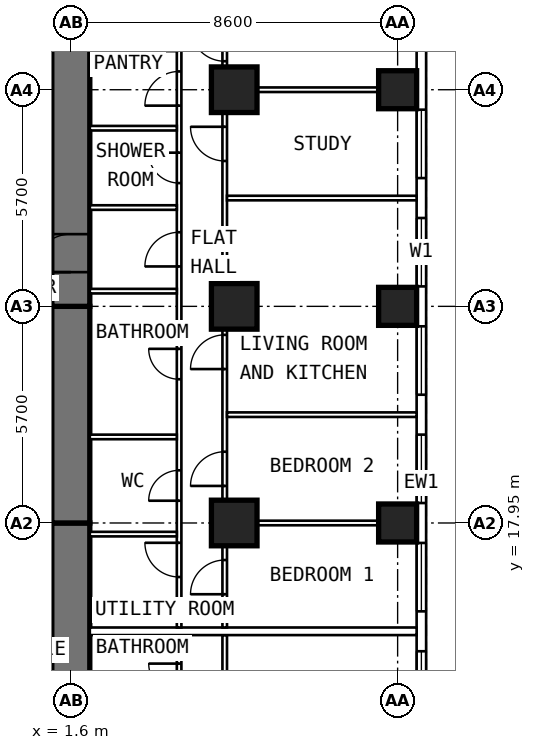
"""IFC4 building model, lengths in metres.
Left out: names, types, materials, properties, quantities, classifications, styles, units other than length and angle.
Written with IfcOpenShell. Run it as: python <this file> out.ifc"""

import sys

from ifc_helpers import new_model, si_unit, direction, frame, frame_2d, origin, origin_2d, place, context, subcontext, project, spatial, rectangle, extrude, element, fill, save


model = new_model("IFC4")
c1 = context("Model", 3, precision=1e-05, world=origin(), true_north=direction((0.0, 1.0)))
c2 = subcontext(c1, "Body", "Model", "MODEL_VIEW")
j1 = project(units=[si_unit("LENGTHUNIT", "METRE"), si_unit("PLANEANGLEUNIT", "RADIAN")], contexts=[c1])
p1 = place(None, origin())
s1 = spatial("IfcSite", under=j1, at=p1, CompositionType="ELEMENT")
p2 = place(p1, origin())
s2 = spatial("IfcBuilding", under=s1, at=p2, CompositionType="ELEMENT")
p3 = place(p2, frame((0.0, 0.0, 57.4)))
s3 = spatial("IfcBuildingStorey", under=s2, at=p3, CompositionType="ELEMENT", Elevation=57.4)
for number, where, z_axis, x_axis in (
    (1, (10.2, 17.95, 0.0), (0.0, 0.0, 1.0), (0.0, 1.0, 0.0)),
    (2, (10.2, 23.65, 0.0), (0.0, 0.0, 1.0), (0.0, 1.0, 0.0)),
    (3, (10.2, 29.35, 0.0), (0.0, 0.0, 1.0), (0.0, 1.0, 0.0)),
):
    element("IfcColumn", number, at=place(p3, frame(where, z_axis=z_axis, x_axis=x_axis)), inside=s3, PredefinedType="COLUMN", context=c2, shape_type="SweptSolid", body=[
        extrude(rectangle(XDim=1.0, YDim=1.0, at=origin_2d()), origin(), (0.0, 0.0, 1.0), 3.6),
    ])
for number, where, z_axis, x_axis in (
    (4, (5.9, 17.95, 0.0), (0.0, 0.0, 1.0), (0.0, 1.0, 0.0)),
    (5, (5.9, 23.65, 0.0), (0.0, 0.0, 1.0), (0.0, 1.0, 0.0)),
    (6, (5.9, 29.35, 0.0), (0.0, 0.0, 1.0), (0.0, 1.0, 0.0)),
):
    element("IfcColumn", number, at=place(p3, frame(where, z_axis=z_axis, x_axis=x_axis)), inside=s3, PredefinedType="COLUMN", context=c2, shape_type="SweptSolid", body=[
        extrude(rectangle(XDim=1.2, YDim=1.2, at=origin_2d()), origin(), (0.0, 0.0, 1.0), 3.6),
    ])
p4 = place(p3, frame((1.6, 9.6, 0.0), z_axis=(0.0, 0.0, 1.0), x_axis=(0.0, 1.0, 0.0)))
e7 = element("IfcWall", 7, at=p4, inside=s3, PredefinedType="SHEAR", context=c2, shape_type="SweptSolid", body=[
    extrude(rectangle(XDim=8.35, YDim=1.0, at=frame_2d((4.175, 0.0))), origin(), (0.0, 0.0, 1.0), 3.6),
])
p5 = place(p4, frame((1.3, 0.0, 0.0)))
e8 = element("IfcOpeningElement", 8, at=p5, cuts=e7, PredefinedType="OPENING", context=c2, shape_type="SweptSolid", body=[
    extrude(rectangle(XDim=1.0, YDim=2.1, at=frame_2d((0.5, 1.05))), frame((0.0, 0.512, 0.0), z_axis=(0.0, -1.0, 0.0), x_axis=(1.0, 0.0, 0.0)), (0.0, 0.0, 1.0), 1.024),
])
p6 = place(p3, frame((1.6, 17.95, 0.0), z_axis=(0.0, 0.0, 1.0), x_axis=(0.0, 1.0, 0.0)))
e9 = element("IfcWall", 9, at=p6, inside=s3, PredefinedType="SHEAR", context=c2, shape_type="SweptSolid", body=[
    extrude(rectangle(XDim=5.7, YDim=1.0, at=frame_2d((2.85, 0.0))), origin(), (0.0, 0.0, 1.0), 3.6),
])
p7 = place(p3, frame((1.6, 23.65, 0.0), z_axis=(0.0, 0.0, 1.0), x_axis=(0.0, 1.0, 0.0)))
e10 = element("IfcWall", 10, at=p7, inside=s3, PredefinedType="SHEAR", context=c2, shape_type="SweptSolid", body=[
    extrude(rectangle(XDim=10.745, YDim=1.0, at=frame_2d((5.373, 0.0))), origin(), (0.0, 0.0, 1.0), 3.6),
])
p8 = place(p7, frame((0.9, 0.0, 0.0)))
e11 = element("IfcOpeningElement", 11, at=p8, cuts=e10, PredefinedType="OPENING", context=c2, shape_type="SweptSolid", body=[
    extrude(rectangle(XDim=1.0, YDim=2.1, at=frame_2d((0.5, 1.05))), frame((0.0, 0.512, 0.0), z_axis=(0.0, -1.0, 0.0), x_axis=(1.0, 0.0, 0.0)), (0.0, 0.0, 1.0), 1.024),
])
p9 = place(p3, frame((10.825, 6.394, 0.0), z_axis=(0.0, 0.0, 1.0), x_axis=(0.0, 1.0, 0.0)))
e12 = element("IfcWall", 12, at=p9, inside=s3, PredefinedType="SOLIDWALL", context=c2, shape_type="SweptSolid", body=[
    extrude(rectangle(XDim=25.241, YDim=0.25, at=frame_2d((12.621, 0.0))), origin(), (0.0, 0.0, 1.0), 3.35),
])
p10 = place(p9, frame((0.681, 0.0, 0.8)))
e13 = element("IfcOpeningElement", 13, at=p10, cuts=e12, PredefinedType="OPENING", context=c2, shape_type="SweptSolid", body=[
    extrude(rectangle(XDim=1.8, YDim=1.8, at=frame_2d((0.9, 0.9))), frame((0.0, 0.137, 0.0), z_axis=(0.0, -1.0, 0.0), x_axis=(1.0, 0.0, 0.0)), (0.0, 0.0, 1.0), 0.274),
])
p11 = place(p9, frame((3.531, 0.0, 0.8)))
e14 = element("IfcOpeningElement", 14, at=p11, cuts=e12, PredefinedType="OPENING", context=c2, shape_type="SweptSolid", body=[
    extrude(rectangle(XDim=1.8, YDim=1.8, at=frame_2d((0.9, 0.9))), frame((0.0, 0.137, 0.0), z_axis=(0.0, -1.0, 0.0), x_axis=(1.0, 0.0, 0.0)), (0.0, 0.0, 1.0), 0.274),
])
p12 = place(p9, frame((6.381, 0.0, 0.8)))
e15 = element("IfcOpeningElement", 15, at=p12, cuts=e12, PredefinedType="OPENING", context=c2, shape_type="SweptSolid", body=[
    extrude(rectangle(XDim=1.8, YDim=1.8, at=frame_2d((0.9, 0.9))), frame((0.0, 0.137, 0.0), z_axis=(0.0, -1.0, 0.0), x_axis=(1.0, 0.0, 0.0)), (0.0, 0.0, 1.0), 0.274),
])
p13 = place(p9, frame((9.231, 0.0, 0.8)))
e16 = element("IfcOpeningElement", 16, at=p13, cuts=e12, PredefinedType="OPENING", context=c2, shape_type="SweptSolid", body=[
    extrude(rectangle(XDim=1.8, YDim=1.8, at=frame_2d((0.9, 0.9))), frame((0.0, 0.137, 0.0), z_axis=(0.0, -1.0, 0.0), x_axis=(1.0, 0.0, 0.0)), (0.0, 0.0, 1.0), 0.274),
])
p14 = place(p9, frame((12.081, 0.0, 0.8)))
e17 = element("IfcOpeningElement", 17, at=p14, cuts=e12, PredefinedType="OPENING", context=c2, shape_type="SweptSolid", body=[
    extrude(rectangle(XDim=1.8, YDim=1.8, at=frame_2d((0.9, 0.9))), frame((0.0, 0.137, 0.0), z_axis=(0.0, -1.0, 0.0), x_axis=(1.0, 0.0, 0.0)), (0.0, 0.0, 1.0), 0.274),
])
p15 = place(p9, frame((14.931, 0.0, 0.8)))
e18 = element("IfcOpeningElement", 18, at=p15, cuts=e12, PredefinedType="OPENING", context=c2, shape_type="SweptSolid", body=[
    extrude(rectangle(XDim=1.8, YDim=1.8, at=frame_2d((0.9, 0.9))), frame((0.0, 0.137, 0.0), z_axis=(0.0, -1.0, 0.0), x_axis=(1.0, 0.0, 0.0)), (0.0, 0.0, 1.0), 0.274),
])
p16 = place(p9, frame((17.781, 0.0, 0.8)))
e19 = element("IfcOpeningElement", 19, at=p16, cuts=e12, PredefinedType="OPENING", context=c2, shape_type="SweptSolid", body=[
    extrude(rectangle(XDim=1.8, YDim=1.8, at=frame_2d((0.9, 0.9))), frame((0.0, 0.137, 0.0), z_axis=(0.0, -1.0, 0.0), x_axis=(1.0, 0.0, 0.0)), (0.0, 0.0, 1.0), 0.274),
])
p17 = place(p9, frame((20.631, 0.0, 0.8)))
e20 = element("IfcOpeningElement", 20, at=p17, cuts=e12, PredefinedType="OPENING", context=c2, shape_type="SweptSolid", body=[
    extrude(rectangle(XDim=1.8, YDim=1.8, at=frame_2d((0.9, 0.9))), frame((0.0, 0.137, 0.0), z_axis=(0.0, -1.0, 0.0), x_axis=(1.0, 0.0, 0.0)), (0.0, 0.0, 1.0), 0.274),
])
p18 = place(p3, frame((4.45, 10.1, 0.0), z_axis=(0.0, 0.0, 1.0), x_axis=(0.0, 1.0, 0.0)))
e21 = element("IfcWall", 21, at=p18, inside=s3, PredefinedType="PARTITIONING", context=c2, shape_type="SweptSolid", body=[
    extrude(rectangle(XDim=4.9, YDim=0.12, at=frame_2d((2.45, 0.0))), origin(), (0.0, 0.0, 1.0), 3.35),
])
p19 = place(p18, frame((0.75, 0.0, 0.0)))
e22 = element("IfcOpeningElement", 22, at=p19, cuts=e21, PredefinedType="OPENING", context=c2, shape_type="SweptSolid", body=[
    extrude(rectangle(XDim=0.9, YDim=2.1, at=frame_2d((0.45, 1.05))), frame((0.0, 0.072, 0.0), z_axis=(0.0, -1.0, 0.0), x_axis=(1.0, 0.0, 0.0)), (0.0, 0.0, 1.0), 0.144),
])
p20 = place(p18, frame((3.35, 0.0, 0.0)))
e23 = element("IfcOpeningElement", 23, at=p20, cuts=e21, PredefinedType="OPENING", context=c2, shape_type="SweptSolid", body=[
    extrude(rectangle(XDim=0.8, YDim=2.1, at=frame_2d((0.4, 1.05))), frame((0.0, 0.072, 0.0), z_axis=(0.0, -1.0, 0.0), x_axis=(1.0, 0.0, 0.0)), (0.0, 0.0, 1.0), 0.144),
])
p21 = place(p3, frame((5.65, 9.6, 0.0), z_axis=(0.0, 0.0, 1.0), x_axis=(0.0, 1.0, 0.0)))
e24 = element("IfcWall", 24, at=p21, inside=s3, PredefinedType="PARTITIONING", context=c2, shape_type="SweptSolid", body=[
    extrude(rectangle(XDim=5.4, YDim=0.12, at=frame_2d((2.7, 0.0))), origin(), (0.0, 0.0, 1.0), 3.35),
])
p22 = place(p21, frame((3.4, 0.0, 0.0)))
e25 = element("IfcOpeningElement", 25, at=p22, cuts=e24, PredefinedType="OPENING", context=c2, shape_type="SweptSolid", body=[
    extrude(rectangle(XDim=0.9, YDim=2.1, at=frame_2d((0.45, 1.05))), frame((0.0, 0.072, 0.0), z_axis=(0.0, -1.0, 0.0), x_axis=(1.0, 0.0, 0.0)), (0.0, 0.0, 1.0), 0.144),
])
p23 = place(p3, frame((4.45, 15.2, 0.0), z_axis=(0.0, 0.0, 1.0), x_axis=(0.0, 1.0, 0.0)))
e26 = element("IfcWall", 26, at=p23, inside=s3, PredefinedType="PARTITIONING", context=c2, shape_type="SweptSolid", body=[
    extrude(rectangle(XDim=19.195, YDim=0.12, at=frame_2d((9.598, 0.0))), origin(), (0.0, 0.0, 1.0), 3.35),
])
p24 = place(p23, frame((1.329, 0.0, 0.0)))
e27 = element("IfcOpeningElement", 27, at=p24, cuts=e26, PredefinedType="OPENING", context=c2, shape_type="SweptSolid", body=[
    extrude(rectangle(XDim=0.9, YDim=2.1, at=frame_2d((0.45, 1.05))), frame((0.0, 0.072, 0.0), z_axis=(0.0, -1.0, 0.0), x_axis=(1.0, 0.0, 0.0)), (0.0, 0.0, 1.0), 0.144),
])
p25 = place(p23, frame((3.336, 0.0, 0.0)))
e28 = element("IfcOpeningElement", 28, at=p25, cuts=e26, PredefinedType="OPENING", context=c2, shape_type="SweptSolid", body=[
    extrude(rectangle(XDim=0.8, YDim=2.1, at=frame_2d((0.4, 1.05))), frame((0.0, 0.072, 0.0), z_axis=(0.0, -1.0, 0.0), x_axis=(1.0, 0.0, 0.0)), (0.0, 0.0, 1.0), 0.144),
])
p26 = place(p23, frame((6.532, 0.0, 0.0)))
e29 = element("IfcOpeningElement", 29, at=p26, cuts=e26, PredefinedType="OPENING", context=c2, shape_type="SweptSolid", body=[
    extrude(rectangle(XDim=0.8, YDim=2.1, at=frame_2d((0.4, 1.05))), frame((0.0, 0.072, 0.0), z_axis=(0.0, -1.0, 0.0), x_axis=(1.0, 0.0, 0.0)), (0.0, 0.0, 1.0), 0.144),
])
p27 = place(p23, frame((9.5, 0.0, 0.0)))
e30 = element("IfcOpeningElement", 30, at=p27, cuts=e26, PredefinedType="OPENING", context=c2, shape_type="SweptSolid", body=[
    extrude(rectangle(XDim=0.9, YDim=2.1, at=frame_2d((0.45, 1.05))), frame((0.0, 0.072, 0.0), z_axis=(0.0, -1.0, 0.0), x_axis=(1.0, 0.0, 0.0)), (0.0, 0.0, 1.0), 0.144),
])
p28 = place(p23, frame((11.694, 0.0, 0.0)))
e31 = element("IfcOpeningElement", 31, at=p28, cuts=e26, PredefinedType="OPENING", context=c2, shape_type="SweptSolid", body=[
    extrude(rectangle(XDim=0.8, YDim=2.1, at=frame_2d((0.4, 1.05))), frame((0.0, 0.072, 0.0), z_axis=(0.0, -1.0, 0.0), x_axis=(1.0, 0.0, 0.0)), (0.0, 0.0, 1.0), 0.144),
])
p29 = place(p23, frame((13.731, 0.0, 0.0)))
e32 = element("IfcOpeningElement", 32, at=p29, cuts=e26, PredefinedType="OPENING", context=c2, shape_type="SweptSolid", body=[
    extrude(rectangle(XDim=0.9, YDim=2.1, at=frame_2d((0.45, 1.05))), frame((0.0, 0.072, 0.0), z_axis=(0.0, -1.0, 0.0), x_axis=(1.0, 0.0, 0.0)), (0.0, 0.0, 1.0), 0.144),
])
p30 = place(p23, frame((15.869, 0.0, 0.0)))
e33 = element("IfcOpeningElement", 33, at=p30, cuts=e26, PredefinedType="OPENING", context=c2, shape_type="SweptSolid", body=[
    extrude(rectangle(XDim=0.8, YDim=2.1, at=frame_2d((0.4, 1.05))), frame((0.0, 0.072, 0.0), z_axis=(0.0, -1.0, 0.0), x_axis=(1.0, 0.0, 0.0)), (0.0, 0.0, 1.0), 0.144),
])
p31 = place(p23, frame((17.472, 0.0, 0.0)))
e34 = element("IfcOpeningElement", 34, at=p31, cuts=e26, PredefinedType="OPENING", context=c2, shape_type="SweptSolid", body=[
    extrude(rectangle(XDim=0.9, YDim=2.1, at=frame_2d((0.45, 1.05))), frame((0.0, 0.072, 0.0), z_axis=(0.0, -1.0, 0.0), x_axis=(1.0, 0.0, 0.0)), (0.0, 0.0, 1.0), 0.144),
])
p32 = place(p3, frame((5.65, 15.2, 0.0), z_axis=(0.0, 0.0, 1.0), x_axis=(0.0, 1.0, 0.0)))
e35 = element("IfcWall", 35, at=p32, inside=s3, PredefinedType="PARTITIONING", context=c2, shape_type="SweptSolid", body=[
    extrude(rectangle(XDim=19.195, YDim=0.12, at=frame_2d((9.598, 0.0))), origin(), (0.0, 0.0, 1.0), 3.35),
])
p33 = place(p32, frame((0.875, 0.0, 0.0)))
e36 = element("IfcOpeningElement", 36, at=p33, cuts=e35, PredefinedType="OPENING", context=c2, shape_type="SweptSolid", body=[
    extrude(rectangle(XDim=0.9, YDim=2.1, at=frame_2d((0.45, 1.05))), frame((0.0, 0.072, 0.0), z_axis=(0.0, -1.0, 0.0), x_axis=(1.0, 0.0, 0.0)), (0.0, 0.0, 1.0), 0.144),
])
p34 = place(p32, frame((3.725, 0.0, 0.0)))
e37 = element("IfcOpeningElement", 37, at=p34, cuts=e35, PredefinedType="OPENING", context=c2, shape_type="SweptSolid", body=[
    extrude(rectangle(XDim=0.9, YDim=2.1, at=frame_2d((0.45, 1.05))), frame((0.0, 0.072, 0.0), z_axis=(0.0, -1.0, 0.0), x_axis=(1.0, 0.0, 0.0)), (0.0, 0.0, 1.0), 0.144),
])
p35 = place(p32, frame((6.8, 0.0, 0.0)))
e38 = element("IfcOpeningElement", 38, at=p35, cuts=e35, PredefinedType="OPENING", context=c2, shape_type="SweptSolid", body=[
    extrude(rectangle(XDim=0.9, YDim=2.1, at=frame_2d((0.45, 1.05))), frame((0.0, 0.072, 0.0), z_axis=(0.0, -1.0, 0.0), x_axis=(1.0, 0.0, 0.0)), (0.0, 0.0, 1.0), 0.144),
])
p36 = place(p32, frame((12.275, 0.0, 0.0)))
e39 = element("IfcOpeningElement", 39, at=p36, cuts=e35, PredefinedType="OPENING", context=c2, shape_type="SweptSolid", body=[
    extrude(rectangle(XDim=0.9, YDim=2.1, at=frame_2d((0.45, 1.05))), frame((0.0, 0.072, 0.0), z_axis=(0.0, -1.0, 0.0), x_axis=(1.0, 0.0, 0.0)), (0.0, 0.0, 1.0), 0.144),
])
p37 = place(p32, frame((14.9, 0.0, 0.0)))
e40 = element("IfcOpeningElement", 40, at=p37, cuts=e35, PredefinedType="OPENING", context=c2, shape_type="SweptSolid", body=[
    extrude(rectangle(XDim=0.9, YDim=2.1, at=frame_2d((0.45, 1.05))), frame((0.0, 0.072, 0.0), z_axis=(0.0, -1.0, 0.0), x_axis=(1.0, 0.0, 0.0)), (0.0, 0.0, 1.0), 0.144),
])
p38 = place(p3, frame((5.71, 17.95, 0.0), z_axis=(0.0, 0.0, 1.0), x_axis=(1.0, 0.0, 0.0)))
e41 = element("IfcWall", 41, at=p38, inside=s3, PredefinedType="PARTITIONING", context=c2, shape_type="SweptSolid", body=[
    extrude(rectangle(XDim=4.99, YDim=0.12, at=frame_2d((2.495, 0.0))), origin(), (0.0, 0.0, 1.0), 2.45),
])
for number, where, z_axis, x_axis in (
    (42, (5.71, 20.8, 0.0), (0.0, 0.0, 1.0), (1.0, 0.0, 0.0)),
    (43, (5.71, 26.5, 0.0), (0.0, 0.0, 1.0), (1.0, 0.0, 0.0)),
):
    element("IfcWall", number, at=place(p3, frame(where, z_axis=z_axis, x_axis=x_axis)), inside=s3, PredefinedType="PARTITIONING", context=c2, shape_type="SweptSolid", body=[
        extrude(rectangle(XDim=4.99, YDim=0.12, at=frame_2d((2.495, 0.0))), origin(), (0.0, 0.0, 1.0), 3.35),
    ])
p39 = place(p3, frame((5.71, 29.35, 0.0), z_axis=(0.0, 0.0, 1.0), x_axis=(1.0, 0.0, 0.0)))
e44 = element("IfcWall", 44, at=p39, inside=s3, PredefinedType="PARTITIONING", context=c2, shape_type="SweptSolid", body=[
    extrude(rectangle(XDim=4.99, YDim=0.12, at=frame_2d((2.495, 0.0))), origin(), (0.0, 0.0, 1.0), 2.45),
])
p40 = place(p3, frame((2.1, 17.657, 0.0), z_axis=(0.0, 0.0, 1.0), x_axis=(1.0, 0.0, 0.0)))
e45 = element("IfcWall", 45, at=p40, inside=s3, PredefinedType="PARTITIONING", context=c2, shape_type="SweptSolid", body=[
    extrude(rectangle(XDim=2.29, YDim=0.12, at=frame_2d((1.145, 0.0))), origin(), (0.0, 0.0, 1.0), 2.45),
])
for number, where, z_axis, x_axis in (
    (46, (2.1, 20.214, 0.0), (0.0, 0.0, 1.0), (1.0, 0.0, 0.0)),
    (47, (2.1, 24.05, 0.0), (0.0, 0.0, 1.0), (1.0, 0.0, 0.0)),
    (48, (2.1, 26.25, 0.0), (0.0, 0.0, 1.0), (1.0, 0.0, 0.0)),
    (49, (2.1, 28.337, 0.0), (0.0, 0.0, 1.0), (1.0, 0.0, 0.0)),
):
    element("IfcWall", number, at=place(p3, frame(where, z_axis=z_axis, x_axis=x_axis)), inside=s3, PredefinedType="PARTITIONING", context=c2, shape_type="SweptSolid", body=[
        extrude(rectangle(XDim=2.29, YDim=0.12, at=frame_2d((1.145, 0.0))), origin(), (0.0, 0.0, 1.0), 3.35),
    ])
p41 = place(p3, frame((2.1, 15.1, 0.0), z_axis=(0.0, 0.0, 1.0), x_axis=(1.0, 0.0, 0.0)))
e50 = element("IfcWall", 50, at=p41, inside=s3, PredefinedType="PARTITIONING", context=c2, shape_type="SweptSolid", body=[
    extrude(rectangle(XDim=8.6, YDim=0.2, at=frame_2d((4.3, 0.0))), origin(), (0.0, 0.0, 1.0), 3.35),
])
p42 = place(p12, origin())
e51 = element("IfcWindow", 51, at=p42, inside=s3, PartitioningType="SINGLE_PANEL", PredefinedType="WINDOW", context=c2, shape_type="SweptSolid", body=[
    extrude(rectangle(XDim=1.8, YDim=1.8, at=frame_2d((0.9, 0.9))), frame((0.0, 0.03, 0.0), z_axis=(0.0, -1.0, 0.0), x_axis=(1.0, 0.0, 0.0)), (0.0, 0.0, 1.0), 0.06),
])
fill(e15, e51)
p43 = place(p13, origin())
e52 = element("IfcWindow", 52, at=p43, inside=s3, PartitioningType="SINGLE_PANEL", PredefinedType="WINDOW", context=c2, shape_type="SweptSolid", body=[
    extrude(rectangle(XDim=1.8, YDim=1.8, at=frame_2d((0.9, 0.9))), frame((0.0, 0.03, 0.0), z_axis=(0.0, -1.0, 0.0), x_axis=(1.0, 0.0, 0.0)), (0.0, 0.0, 1.0), 0.06),
])
fill(e16, e52)
p44 = place(p14, origin())
e53 = element("IfcWindow", 53, at=p44, inside=s3, PartitioningType="SINGLE_PANEL", PredefinedType="WINDOW", context=c2, shape_type="SweptSolid", body=[
    extrude(rectangle(XDim=1.8, YDim=1.8, at=frame_2d((0.9, 0.9))), frame((0.0, 0.03, 0.0), z_axis=(0.0, -1.0, 0.0), x_axis=(1.0, 0.0, 0.0)), (0.0, 0.0, 1.0), 0.06),
])
fill(e17, e53)
p45 = place(p15, origin())
e54 = element("IfcWindow", 54, at=p45, inside=s3, PartitioningType="SINGLE_PANEL", PredefinedType="WINDOW", context=c2, shape_type="SweptSolid", body=[
    extrude(rectangle(XDim=1.8, YDim=1.8, at=frame_2d((0.9, 0.9))), frame((0.0, 0.03, 0.0), z_axis=(0.0, -1.0, 0.0), x_axis=(1.0, 0.0, 0.0)), (0.0, 0.0, 1.0), 0.06),
])
fill(e18, e54)
p46 = place(p16, origin())
e55 = element("IfcWindow", 55, at=p46, inside=s3, PartitioningType="SINGLE_PANEL", PredefinedType="WINDOW", context=c2, shape_type="SweptSolid", body=[
    extrude(rectangle(XDim=1.8, YDim=1.8, at=frame_2d((0.9, 0.9))), frame((0.0, 0.03, 0.0), z_axis=(0.0, -1.0, 0.0), x_axis=(1.0, 0.0, 0.0)), (0.0, 0.0, 1.0), 0.06),
])
fill(e19, e55)
p47 = place(p17, origin())
e56 = element("IfcWindow", 56, at=p47, inside=s3, PartitioningType="SINGLE_PANEL", PredefinedType="WINDOW", context=c2, shape_type="SweptSolid", body=[
    extrude(rectangle(XDim=1.8, YDim=1.8, at=frame_2d((0.9, 0.9))), frame((0.0, 0.03, 0.0), z_axis=(0.0, -1.0, 0.0), x_axis=(1.0, 0.0, 0.0)), (0.0, 0.0, 1.0), 0.06),
])
fill(e20, e56)
p48 = place(p20, origin())
e57 = element("IfcDoor", 57, at=p48, inside=s3, OperationType="SINGLE_SWING_RIGHT", PredefinedType="DOOR", context=c2, shape_type="SweptSolid", body=[
    extrude(rectangle(XDim=0.8, YDim=2.1, at=frame_2d((0.4, 1.05))), frame((0.0, 0.025, 0.0), z_axis=(0.0, -1.0, 0.0), x_axis=(1.0, 0.0, 0.0)), (0.0, 0.0, 1.0), 0.05),
])
fill(e23, e57)
p49 = place(p8, origin())
e58 = element("IfcDoor", 58, at=p49, inside=s3, OperationType="SINGLE_SWING_LEFT", PredefinedType="DOOR", context=c2, shape_type="SweptSolid", body=[
    extrude(rectangle(XDim=1.0, YDim=2.1, at=frame_2d((0.5, 1.05))), frame((0.0, 0.25, 0.0), z_axis=(0.0, -1.0, 0.0), x_axis=(1.0, 0.0, 0.0)), (0.0, 0.0, 1.0), 0.5),
])
fill(e11, e58)
p50 = place(p33, origin())
e59 = element("IfcDoor", 59, at=p50, inside=s3, OperationType="SINGLE_SWING_LEFT", PredefinedType="DOOR", context=c2, shape_type="SweptSolid", body=[
    extrude(rectangle(XDim=0.9, YDim=2.1, at=frame_2d((0.45, 1.05))), frame((0.0, 0.025, 0.0), z_axis=(0.0, -1.0, 0.0), x_axis=(1.0, 0.0, 0.0)), (0.0, 0.0, 1.0), 0.05),
])
fill(e36, e59)
p51 = place(p34, origin())
e60 = element("IfcDoor", 60, at=p51, inside=s3, OperationType="SINGLE_SWING_LEFT", PredefinedType="DOOR", context=c2, shape_type="SweptSolid", body=[
    extrude(rectangle(XDim=0.9, YDim=2.1, at=frame_2d((0.45, 1.05))), frame((0.0, 0.025, 0.0), z_axis=(0.0, -1.0, 0.0), x_axis=(1.0, 0.0, 0.0)), (0.0, 0.0, 1.0), 0.05),
])
fill(e37, e60)
p52 = place(p35, origin())
e61 = element("IfcDoor", 61, at=p52, inside=s3, OperationType="SINGLE_SWING_LEFT", PredefinedType="DOOR", context=c2, shape_type="SweptSolid", body=[
    extrude(rectangle(XDim=0.9, YDim=2.1, at=frame_2d((0.45, 1.05))), frame((0.0, 0.025, 0.0), z_axis=(0.0, -1.0, 0.0), x_axis=(1.0, 0.0, 0.0)), (0.0, 0.0, 1.0), 0.05),
])
fill(e38, e61)
p53 = place(p36, origin())
e62 = element("IfcDoor", 62, at=p53, inside=s3, OperationType="SINGLE_SWING_RIGHT", PredefinedType="DOOR", context=c2, shape_type="SweptSolid", body=[
    extrude(rectangle(XDim=0.9, YDim=2.1, at=frame_2d((0.45, 1.05))), frame((0.0, 0.025, 0.0), z_axis=(0.0, -1.0, 0.0), x_axis=(1.0, 0.0, 0.0)), (0.0, 0.0, 1.0), 0.05),
])
fill(e39, e62)
p54 = place(p37, origin())
e63 = element("IfcDoor", 63, at=p54, inside=s3, OperationType="SINGLE_SWING_RIGHT", PredefinedType="DOOR", context=c2, shape_type="SweptSolid", body=[
    extrude(rectangle(XDim=0.9, YDim=2.1, at=frame_2d((0.45, 1.05))), frame((0.0, 0.025, 0.0), z_axis=(0.0, -1.0, 0.0), x_axis=(1.0, 0.0, 0.0)), (0.0, 0.0, 1.0), 0.05),
])
fill(e40, e63)
p55 = place(p24, origin())
e64 = element("IfcDoor", 64, at=p55, inside=s3, OperationType="SINGLE_SWING_RIGHT", PredefinedType="DOOR", context=c2, shape_type="SweptSolid", body=[
    extrude(rectangle(XDim=0.9, YDim=2.1, at=frame_2d((0.45, 1.05))), frame((0.0, 0.025, 0.0), z_axis=(0.0, -1.0, 0.0), x_axis=(1.0, 0.0, 0.0)), (0.0, 0.0, 1.0), 0.05),
])
fill(e27, e64)
p56 = place(p25, origin())
e65 = element("IfcDoor", 65, at=p56, inside=s3, OperationType="SINGLE_SWING_LEFT", PredefinedType="DOOR", context=c2, shape_type="SweptSolid", body=[
    extrude(rectangle(XDim=0.8, YDim=2.1, at=frame_2d((0.4, 1.05))), frame((0.0, 0.025, 0.0), z_axis=(0.0, -1.0, 0.0), x_axis=(1.0, 0.0, 0.0)), (0.0, 0.0, 1.0), 0.05),
])
fill(e28, e65)
p57 = place(p26, origin())
e66 = element("IfcDoor", 66, at=p57, inside=s3, OperationType="SINGLE_SWING_RIGHT", PredefinedType="DOOR", context=c2, shape_type="SweptSolid", body=[
    extrude(rectangle(XDim=0.8, YDim=2.1, at=frame_2d((0.4, 1.05))), frame((0.0, 0.025, 0.0), z_axis=(0.0, -1.0, 0.0), x_axis=(1.0, 0.0, 0.0)), (0.0, 0.0, 1.0), 0.05),
])
fill(e29, e66)
p58 = place(p27, origin())
e67 = element("IfcDoor", 67, at=p58, inside=s3, OperationType="SINGLE_SWING_LEFT", PredefinedType="DOOR", context=c2, shape_type="SweptSolid", body=[
    extrude(rectangle(XDim=0.9, YDim=2.1, at=frame_2d((0.45, 1.05))), frame((0.0, 0.025, 0.0), z_axis=(0.0, -1.0, 0.0), x_axis=(1.0, 0.0, 0.0)), (0.0, 0.0, 1.0), 0.05),
])
fill(e30, e67)
p59 = place(p28, origin())
e68 = element("IfcDoor", 68, at=p59, inside=s3, OperationType="SINGLE_SWING_RIGHT", PredefinedType="DOOR", context=c2, shape_type="SweptSolid", body=[
    extrude(rectangle(XDim=0.8, YDim=2.1, at=frame_2d((0.4, 1.05))), frame((0.0, 0.025, 0.0), z_axis=(0.0, -1.0, 0.0), x_axis=(1.0, 0.0, 0.0)), (0.0, 0.0, 1.0), 0.05),
])
fill(e31, e68)
p60 = place(p29, origin())
e69 = element("IfcDoor", 69, at=p60, inside=s3, OperationType="SINGLE_SWING_LEFT", PredefinedType="DOOR", context=c2, shape_type="SweptSolid", body=[
    extrude(rectangle(XDim=0.9, YDim=2.1, at=frame_2d((0.45, 1.05))), frame((0.0, 0.025, 0.0), z_axis=(0.0, -1.0, 0.0), x_axis=(1.0, 0.0, 0.0)), (0.0, 0.0, 1.0), 0.05),
])
fill(e32, e69)
save(model, sys.argv[1])
